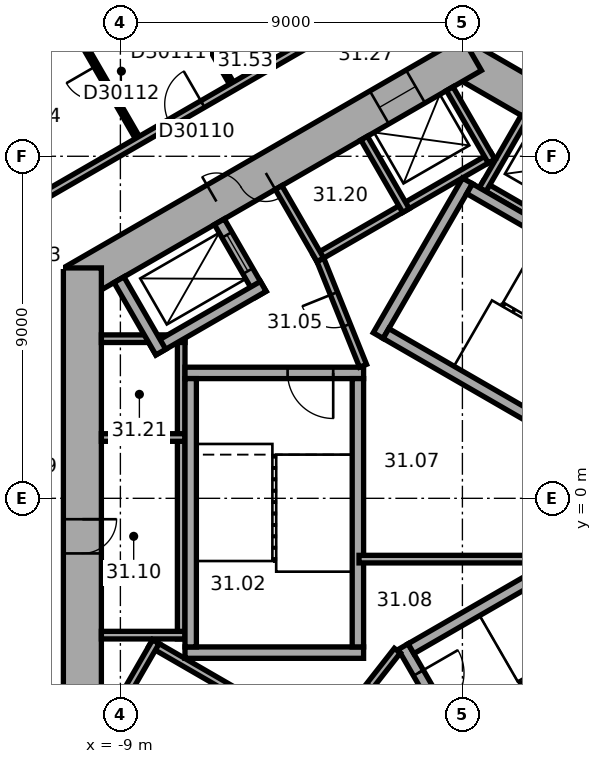
"""IFC4 building model, lengths in metres.
Left out: names, types, materials, properties, quantities, classifications, styles, units other than length and angle.
Written with IfcOpenShell. Run it as: python <this file> out.ifc"""

import sys

from ifc_helpers import new_model, si_unit, direction, frame, frame_2d, origin, place, context, subcontext, project, spatial, rectangle, extrude, element, fill, save


model = new_model("IFC4")
c1 = context("Model", 3, precision=1e-05, world=origin(), true_north=direction((0.0, 1.0)))
c2 = subcontext(c1, "Body", "Model", "MODEL_VIEW")
j1 = project(units=[si_unit("LENGTHUNIT", "METRE"), si_unit("PLANEANGLEUNIT", "RADIAN")], contexts=[c1])
p1 = place(None, origin())
s1 = spatial("IfcSite", under=j1, at=p1, CompositionType="ELEMENT")
p2 = place(p1, origin())
s2 = spatial("IfcBuilding", under=s1, at=p2, CompositionType="ELEMENT")
p3 = place(p2, frame((0.0, 0.0, 128.1)))
s3 = spatial("IfcBuildingStorey", under=s2, at=p3, CompositionType="ELEMENT", Elevation=128.1)
p4 = place(p3, frame((10.25, 5.629, 0.0), z_axis=(0.0, 0.0, 1.0), x_axis=(-0.866022616891, 0.50000482701, 0.0)))
e1 = element("IfcWall", 1, at=p4, inside=s3, PredefinedType="SHEAR", context=c2, shape_type="SweptSolid", body=[
    extrude(rectangle(XDim=12.125, YDim=1.0, at=frame_2d((6.062, 0.0))), origin(), (0.0, 0.0, 1.0), 3.7),
])
p5 = place(p4, frame((2.612, 0.0, 0.0)))
e2 = element("IfcOpeningElement", 2, at=p5, cuts=e1, PredefinedType="OPENING", context=c2, shape_type="SweptSolid", body=[
    extrude(rectangle(XDim=1.1, YDim=2.1, at=frame_2d((0.55, 1.05))), frame((0.0, 0.51, 0.0), z_axis=(0.0, -1.0, 0.0), x_axis=(1.0, 0.0, 0.0)), (0.0, 0.0, 1.0), 1.02),
])
p6 = place(p4, frame((5.212, 0.0, 0.0)))
e3 = element("IfcOpeningElement", 3, at=p6, cuts=e1, PredefinedType="OPENING", context=c2, shape_type="SweptSolid", body=[
    extrude(rectangle(XDim=1.1, YDim=2.1, at=frame_2d((0.55, 1.05))), frame((0.0, 0.51, 0.0), z_axis=(0.0, -1.0, 0.0), x_axis=(1.0, 0.0, 0.0)), (0.0, 0.0, 1.0), 1.02),
])
p7 = place(p4, frame((7.812, 0.0, 0.0)))
e4 = element("IfcOpeningElement", 4, at=p7, cuts=e1, PredefinedType="OPENING", context=c2, shape_type="SweptSolid", body=[
    extrude(rectangle(XDim=1.1, YDim=2.1, at=frame_2d((0.55, 1.05))), frame((0.0, 0.51, 0.0), z_axis=(0.0, -1.0, 0.0), x_axis=(1.0, 0.0, 0.0)), (0.0, 0.0, 1.0), 1.02),
])
p8 = place(p3, frame((0.25, 11.691, 0.0), z_axis=(0.0, 0.0, 1.0), x_axis=(-0.866022616891, -0.50000482701, 0.0)))
e5 = element("IfcWall", 5, at=p8, inside=s3, PredefinedType="SHEAR", context=c2, shape_type="SweptSolid", body=[
    extrude(rectangle(XDim=12.125, YDim=1.0, at=frame_2d((6.062, 0.0))), origin(), (0.0, 0.0, 1.0), 3.7),
])
p9 = place(p8, frame((6.262, 0.0, 0.0)))
e6 = element("IfcOpeningElement", 6, at=p9, cuts=e5, PredefinedType="OPENING", context=c2, shape_type="SweptSolid", body=[
    extrude(rectangle(XDim=1.5, YDim=2.1, at=frame_2d((0.75, 1.05))), frame((0.0, 0.51, 0.0), z_axis=(0.0, -1.0, 0.0), x_axis=(1.0, 0.0, 0.0)), (0.0, 0.0, 1.0), 1.02),
])
p10 = place(p8, frame((1.712, 0.0, 0.0)))
e7 = element("IfcOpeningElement", 7, at=p10, cuts=e5, PredefinedType="OPENING", context=c2, shape_type="SweptSolid", body=[
    extrude(rectangle(XDim=1.1, YDim=2.1, at=frame_2d((0.55, 1.05))), frame((0.0, 0.51, 0.0), z_axis=(0.0, -1.0, 0.0), x_axis=(1.0, 0.0, 0.0)), (0.0, 0.0, 1.0), 1.02),
])
p11 = place(p3, frame((-10.0, 6.062, 0.0), z_axis=(0.0, 0.0, 1.0), x_axis=(0.0, -1.0, 0.0)))
e8 = element("IfcWall", 8, at=p11, inside=s3, PredefinedType="SHEAR", context=c2, shape_type="SweptSolid", body=[
    extrude(rectangle(XDim=12.125, YDim=1.0, at=frame_2d((6.062, 0.0))), origin(), (0.0, 0.0, 1.0), 3.7),
])
p12 = place(p11, frame((6.612, 0.0, 0.0)))
e9 = element("IfcOpeningElement", 9, at=p12, cuts=e8, PredefinedType="OPENING", context=c2, shape_type="SweptSolid", body=[
    extrude(rectangle(XDim=0.9, YDim=2.1, at=frame_2d((0.45, 1.05))), frame((0.0, 0.51, 0.0), z_axis=(0.0, -1.0, 0.0), x_axis=(1.0, 0.0, 0.0)), (0.0, 0.0, 1.0), 1.02),
])
p13 = place(p3, frame((7.424, 4.259, 0.0), z_axis=(0.0, 0.0, 1.0), x_axis=(-0.866026010844, 0.49999894854, 0.0)))
e10 = element("IfcWall", 10, at=p13, inside=s3, PredefinedType="PARTITIONING", context=c2, shape_type="SweptSolid", body=[
    extrude(rectangle(XDim=8.0, YDim=0.2, at=frame_2d((4.0, 0.0))), origin(), (0.0, 0.0, 1.0), 3.42),
])
p14 = place(p3, frame((0.532, 8.122, 0.0), z_axis=(0.0, 0.0, 1.0), x_axis=(0.500077893725, 0.86598042715, 0.0)))
e11 = element("IfcWall", 11, at=p14, inside=s3, PredefinedType="PARTITIONING", context=c2, shape_type="SweptSolid", body=[
    extrude(rectangle(XDim=2.2, YDim=0.2, at=frame_2d((1.1, 0.0))), origin(), (0.0, 0.0, 1.0), 3.42),
])
p15 = place(p3, frame((0.803, 9.009, 0.0), z_axis=(0.0, 0.0, 1.0), x_axis=(-0.866028230842, -0.499995103361, 0.0)))
e12 = element("IfcWall", 12, at=p15, inside=s3, PredefinedType="PARTITIONING", context=c2, shape_type="SweptSolid", body=[
    extrude(rectangle(XDim=5.4, YDim=0.2, at=frame_2d((2.7, 0.0))), origin(), (0.0, 0.0, 1.0), 3.42),
])
p16 = place(p3, frame((0.767, 8.872, 0.0), z_axis=(0.0, 0.0, 1.0), x_axis=(-0.499994660107, 0.866028486751, 0.0)))
e13 = element("IfcWall", 13, at=p16, inside=s3, PredefinedType="PARTITIONING", context=c2, shape_type="SweptSolid", body=[
    extrude(rectangle(XDim=2.2, YDim=0.2, at=frame_2d((1.1, 0.0))), origin(), (0.0, 0.0, 1.0), 3.42),
])
for number, where, z_axis, x_axis in (
    (14, (-1.485, 7.572, 0.0), (0.0, 0.0, 1.0), (-0.5, 0.866, 0.0)),
    (15, (-3.737, 6.272, 0.0), (0.0, 0.0, 1.0), (-0.5, 0.866, 0.0)),
):
    element("IfcWall", number, at=place(p3, frame(where, z_axis=z_axis, x_axis=x_axis)), inside=s3, PredefinedType="PARTITIONING", context=c2, shape_type="SweptSolid", body=[
        extrude(rectangle(XDim=2.2, YDim=0.2, at=frame_2d((1.1, 0.0))), origin(), (0.0, 0.0, 1.0), 3.42),
    ])
p17 = place(p3, frame((-7.4, 4.3, 0.0), z_axis=(0.0, 0.0, 1.0), x_axis=(0.0, -1.0, 0.0)))
e16 = element("IfcWall", 16, at=p17, inside=s3, PredefinedType="PARTITIONING", context=c2, shape_type="SweptSolid", body=[
    extrude(rectangle(XDim=8.0, YDim=0.2, at=frame_2d((4.0, 0.0))), origin(), (0.0, 0.0, 1.0), 3.42),
])
for number, where, z_axis, x_axis in (
    (17, (-7.3, 4.2, 0.0), (0.0, 0.0, 1.0), (-1.0, 0.0, 0.0)),
    (18, (-7.3, 1.6, 0.0), (0.0, 0.0, 1.0), (-1.0, 0.0, 0.0)),
    (19, (-7.3, -3.6, 0.0), (0.0, 0.0, 1.0), (-1.0, 0.0, 0.0)),
):
    element("IfcWall", number, at=place(p3, frame(where, z_axis=z_axis, x_axis=x_axis)), inside=s3, PredefinedType="PARTITIONING", context=c2, shape_type="SweptSolid", body=[
        extrude(rectangle(XDim=2.2, YDim=0.2, at=frame_2d((1.1, 0.0))), origin(), (0.0, 0.0, 1.0), 3.42),
    ])
p18 = place(p3, frame((-8.203, -3.809, 0.0), z_axis=(0.0, 0.0, 1.0), x_axis=(0.866028230842, -0.499995103361, 0.0)))
e20 = element("IfcWall", 20, at=p18, inside=s3, PredefinedType="PARTITIONING", context=c2, shape_type="SweptSolid", body=[
    extrude(rectangle(XDim=5.4, YDim=0.2, at=frame_2d((2.7, 0.0))), origin(), (0.0, 0.0, 1.0), 3.42),
])
p19 = place(p3, frame((-8.067, -3.772, 0.0), z_axis=(0.0, 0.0, 1.0), x_axis=(-0.50002983664, -0.866008176907, 0.0)))
e21 = element("IfcWall", 21, at=p19, inside=s3, PredefinedType="PARTITIONING", context=c2, shape_type="SweptSolid", body=[
    extrude(rectangle(XDim=2.2, YDim=0.2, at=frame_2d((1.1, 0.0))), origin(), (0.0, 0.0, 1.0), 3.42),
])
p20 = place(p3, frame((-0.024, -8.559, 0.0), z_axis=(0.0, 0.0, 1.0), x_axis=(0.866026010844, 0.49999894854, 0.0)))
e22 = element("IfcWall", 22, at=p20, inside=s3, PredefinedType="PARTITIONING", context=c2, shape_type="SweptSolid", body=[
    extrude(rectangle(XDim=8.0, YDim=0.2, at=frame_2d((4.0, 0.0))), origin(), (0.0, 0.0, 1.0), 3.42),
])
p21 = place(p3, frame((-2.216, 4.282, 0.0), z_axis=(0.0, 0.0, 1.0), x_axis=(0.499977259774, 0.866038532462, 0.0)))
e23 = element("IfcWall", 23, at=p21, inside=s3, PredefinedType="SHEAR", context=c2, shape_type="SweptSolid", body=[
    extrude(rectangle(XDim=4.7, YDim=0.3, at=frame_2d((2.35, 0.0))), origin(), (0.0, 0.0, 1.0), 3.42),
])
for number, where, z_axis, x_axis in (
    (24, (4.103, 0.807, 0.0), (0.0, 0.0, 1.0), (-0.866, 0.5, 0.0)),
    (25, (6.303, 4.617, 0.0), (0.0, 0.0, 1.0), (-0.866, 0.5, 0.0)),
):
    element("IfcWall", number, at=place(p3, frame(where, z_axis=z_axis, x_axis=x_axis)), inside=s3, PredefinedType="SHEAR", context=c2, shape_type="SweptSolid", body=[
        extrude(rectangle(XDim=7.06, YDim=0.3, at=frame_2d((3.53, 0.0))), origin(), (0.0, 0.0, 1.0), 3.42),
    ])
p22 = place(p3, frame((-2.6, 3.3, 0.0), z_axis=(0.0, 0.0, 1.0), x_axis=(-1.0, 0.0, 0.0)))
e26 = element("IfcWall", 26, at=p22, inside=s3, PredefinedType="SHEAR", context=c2, shape_type="SweptSolid", body=[
    extrude(rectangle(XDim=4.7, YDim=0.3, at=frame_2d((2.35, 0.0))), origin(), (0.0, 0.0, 1.0), 3.42),
])
p23 = place(p22, frame((0.8, 0.0, 0.0)))
e27 = element("IfcOpeningElement", 27, at=p23, cuts=e26, PredefinedType="OPENING", context=c2, shape_type="SweptSolid", body=[
    extrude(rectangle(XDim=1.2, YDim=2.1, at=frame_2d((0.6, 1.05))), frame((0.0, 0.16, 0.0), z_axis=(0.0, -1.0, 0.0), x_axis=(1.0, 0.0, 0.0)), (0.0, 0.0, 1.0), 0.32),
])
p24 = place(p3, frame((-2.6, -4.06, 0.0), z_axis=(0.0, 0.0, 1.0), x_axis=(-1.0, 0.0, 0.0)))
e28 = element("IfcWall", 28, at=p24, inside=s3, PredefinedType="SHEAR", context=c2, shape_type="SweptSolid", body=[
    extrude(rectangle(XDim=4.7, YDim=0.3, at=frame_2d((2.35, 0.0))), origin(), (0.0, 0.0, 1.0), 3.42),
])
for number, where, z_axis, x_axis in (
    (29, (-2.75, 3.15, 0.0), (0.0, 0.0, 1.0), (0.0, -1.0, 0.0)),
    (30, (-7.15, 3.15, 0.0), (0.0, 0.0, 1.0), (0.0, -1.0, 0.0)),
):
    element("IfcWall", number, at=place(p3, frame(where, z_axis=z_axis, x_axis=x_axis)), inside=s3, PredefinedType="SHEAR", context=c2, shape_type="SweptSolid", body=[
        extrude(rectangle(XDim=7.06, YDim=0.3, at=frame_2d((3.53, 0.0))), origin(), (0.0, 0.0, 1.0), 3.42),
    ])
p25 = place(p3, frame((-1.558, -3.902, 0.0), z_axis=(0.0, 0.0, 1.0), x_axis=(0.499977259774, -0.866038532462, 0.0)))
e31 = element("IfcWall", 31, at=p25, inside=s3, PredefinedType="SHEAR", context=c2, shape_type="SweptSolid", body=[
    extrude(rectangle(XDim=4.7, YDim=0.3, at=frame_2d((2.35, 0.0))), origin(), (0.0, 0.0, 1.0), 3.42),
])
p26 = place(p25, frame((0.8, 0.0, 0.0)))
e32 = element("IfcOpeningElement", 32, at=p26, cuts=e31, PredefinedType="OPENING", context=c2, shape_type="SweptSolid", body=[
    extrude(rectangle(XDim=1.2, YDim=2.1, at=frame_2d((0.6, 1.05))), frame((0.0, 0.16, 0.0), z_axis=(0.0, -1.0, 0.0), x_axis=(1.0, 0.0, 0.0)), (0.0, 0.0, 1.0), 0.32),
])
for number, where, z_axis, x_axis in (
    (33, (-1.353, -3.957, 0.0), (0.0, 0.0, 1.0), (0.866, 0.5, 0.0)),
    (34, (0.847, -7.767, 0.0), (0.0, 0.0, 1.0), (0.866, 0.5, 0.0)),
):
    element("IfcWall", number, at=place(p3, frame(where, z_axis=z_axis, x_axis=x_axis)), inside=s3, PredefinedType="SHEAR", context=c2, shape_type="SweptSolid", body=[
        extrude(rectangle(XDim=7.06, YDim=0.3, at=frame_2d((3.53, 0.0))), origin(), (0.0, 0.0, 1.0), 3.42),
    ])
p27 = place(p3, frame((-5.295, 5.372, 0.0), z_axis=(0.0, 0.0, 1.0), x_axis=(-0.500077893725, 0.86598042715, 0.0)))
e35 = element("IfcWall", 35, at=p27, inside=s3, PredefinedType="SHEAR", context=c2, shape_type="SweptSolid", body=[
    extrude(rectangle(XDim=2.2, YDim=0.3, at=frame_2d((1.1, 0.0))), origin(), (0.0, 0.0, 1.0), 3.42),
])
p28 = place(p27, frame((0.7, 0.0, 0.0)))
e36 = element("IfcOpeningElement", 36, at=p28, cuts=e35, PredefinedType="OPENING", context=c2, shape_type="SweptSolid", body=[
    extrude(rectangle(XDim=1.1, YDim=2.1, at=frame_2d((0.55, 1.05))), frame((0.0, 0.16, 0.0), z_axis=(0.0, -1.0, 0.0), x_axis=(1.0, 0.0, 0.0)), (0.0, 0.0, 1.0), 0.32),
])
p29 = place(p3, frame((-5.24, 5.577, 0.0), z_axis=(0.0, 0.0, 1.0), x_axis=(-0.866014461049, -0.500018952895, 0.0)))
e37 = element("IfcWall", 37, at=p29, inside=s3, PredefinedType="SHEAR", context=c2, shape_type="SweptSolid", body=[
    extrude(rectangle(XDim=3.35, YDim=0.3, at=frame_2d((1.675, 0.0))), origin(), (0.0, 0.0, 1.0), 3.42),
])
p30 = place(p3, frame((-7.937, 3.847, 0.0), z_axis=(0.0, 0.0, 1.0), x_axis=(-0.50002983664, 0.866008176907, 0.0)))
e38 = element("IfcWall", 38, at=p30, inside=s3, PredefinedType="SHEAR", context=c2, shape_type="SweptSolid", body=[
    extrude(rectangle(XDim=2.2, YDim=0.3, at=frame_2d((1.1, 0.0))), origin(), (0.0, 0.0, 1.0), 3.42),
])
p31 = place(p3, frame((-2.615, 3.487, 0.0), z_axis=(0.0, 0.0, 1.0), x_axis=(-0.373576831041, 0.92759924068, 0.0)))
e39 = element("IfcWall", 39, at=p31, inside=s3, PredefinedType="PARTITIONING", context=c2, shape_type="SweptSolid", body=[
    extrude(rectangle(XDim=3.002, YDim=0.2, at=frame_2d((1.501, 0.0))), origin(), (0.0, 0.0, 1.0), 3.42),
])
p32 = place(p31, frame((1.15, 0.0, 0.0)))
e40 = element("IfcOpeningElement", 40, at=p32, cuts=e39, PredefinedType="OPENING", context=c2, shape_type="SweptSolid", body=[
    extrude(rectangle(XDim=0.9, YDim=2.1, at=frame_2d((0.45, 1.05))), frame((0.0, 0.11, 0.0), z_axis=(0.0, -1.0, 0.0), x_axis=(1.0, 0.0, 0.0)), (0.0, 0.0, 1.0), 0.22),
])
p33 = place(p3, frame((-1.712, -4.008, 0.0), z_axis=(0.0, 0.0, 1.0), x_axis=(-0.616549420702, -0.787316208287, 0.0)))
e41 = element("IfcWall", 41, at=p33, inside=s3, PredefinedType="PARTITIONING", context=c2, shape_type="SweptSolid", body=[
    extrude(rectangle(XDim=3.002, YDim=0.2, at=frame_2d((1.501, 0.0))), origin(), (0.0, 0.0, 1.0), 3.42),
])
p34 = place(p33, frame((1.15, 0.0, 0.0)))
e42 = element("IfcOpeningElement", 42, at=p34, cuts=e41, PredefinedType="OPENING", context=c2, shape_type="SweptSolid", body=[
    extrude(rectangle(XDim=0.9, YDim=2.1, at=frame_2d((0.45, 1.05))), frame((0.0, 0.11, 0.0), z_axis=(0.0, -1.0, 0.0), x_axis=(1.0, 0.0, 0.0)), (0.0, 0.0, 1.0), 0.22),
])
p35 = place(p3, frame((-2.72, -1.6, 0.0), z_axis=(0.0, 0.0, 1.0), x_axis=(1.0, 0.0, 0.0)))
e43 = element("IfcWall", 43, at=p35, inside=s3, PredefinedType="PARTITIONING", context=c2, shape_type="SweptSolid", body=[
    extrude(rectangle(XDim=5.269, YDim=0.2, at=frame_2d((2.634, 0.0))), origin(), (0.0, 0.0, 1.0), 3.42),
])
p36 = place(p3, frame((-13.556, 10.649, 0.0), z_axis=(0.0, 0.0, 1.0), x_axis=(0.866020939036, 0.500007733091, 0.0)))
e44 = element("IfcWall", 44, at=p36, inside=s3, PredefinedType="PARTITIONING", context=c2, shape_type="SweptSolid", body=[
    extrude(rectangle(XDim=3.753, YDim=0.12, at=frame_2d((1.877, 0.0))), origin(), (0.0, 0.0, 1.0), 3.42),
])
p37 = place(p3, frame((-10.275, 12.473, 0.0), z_axis=(0.0, 0.0, 1.0), x_axis=(0.500009156386, -0.866020117278, 0.0)))
e45 = element("IfcWall", 45, at=p37, inside=s3, PredefinedType="PARTITIONING", context=c2, shape_type="SweptSolid", body=[
    extrude(rectangle(XDim=3.44, YDim=0.12, at=frame_2d((1.72, 0.0))), origin(), (0.0, 0.0, 1.0), 3.42),
])
p38 = place(p37, frame((1.27, 0.0, 0.0)))
e46 = element("IfcOpeningElement", 46, at=p38, cuts=e45, PredefinedType="OPENING", context=c2, shape_type="SweptSolid", body=[
    extrude(rectangle(XDim=0.9, YDim=2.1, at=frame_2d((0.45, 1.05))), frame((0.0, 0.07, 0.0), z_axis=(0.0, -1.0, 0.0), x_axis=(1.0, 0.0, 0.0)), (0.0, 0.0, 1.0), 0.14),
])
p39 = place(p3, frame((-6.078, 10.925, 0.0), z_axis=(0.0, 0.0, 1.0), x_axis=(-0.500002508028, 0.866023955769, 0.0)))
e47 = element("IfcWall", 47, at=p39, inside=s3, PredefinedType="PARTITIONING", context=c2, shape_type="SweptSolid", body=[
    extrude(rectangle(XDim=2.44, YDim=0.12, at=frame_2d((1.22, 0.0))), origin(), (0.0, 0.0, 1.0), 2.87),
])
p40 = place(p39, frame((0.77, 0.0, 0.0)))
e48 = element("IfcOpeningElement", 48, at=p40, cuts=e47, PredefinedType="OPENING", context=c2, shape_type="SweptSolid", body=[
    extrude(rectangle(XDim=0.9, YDim=2.1, at=frame_2d((0.45, 1.05))), frame((0.0, 0.07, 0.0), z_axis=(0.0, -1.0, 0.0), x_axis=(1.0, 0.0, 0.0)), (0.0, 0.0, 1.0), 0.14),
])
p41 = place(p3, frame((-4.209, 11.888, 0.0), z_axis=(0.0, 0.0, 1.0), x_axis=(-0.866020930448, -0.500007747966, 0.0)))
e49 = element("IfcWall", 49, at=p41, inside=s3, PredefinedType="PARTITIONING", context=c2, shape_type="SweptSolid", body=[
    extrude(rectangle(XDim=8.321, YDim=0.2, at=frame_2d((4.161, 0.0))), origin(), (0.0, 0.0, 1.0), 3.42),
])
p42 = place(p41, frame((3.031, 0.0, 0.0)))
e50 = element("IfcOpeningElement", 50, at=p42, cuts=e49, PredefinedType="OPENING", context=c2, shape_type="SweptSolid", body=[
    extrude(rectangle(XDim=1.0, YDim=2.1, at=frame_2d((0.5, 1.05))), frame((0.0, 0.11, 0.0), z_axis=(0.0, -1.0, 0.0), x_axis=(1.0, 0.0, 0.0)), (0.0, 0.0, 1.0), 0.22),
])
p43 = place(p9, origin())
e51 = element("IfcDoor", 51, at=p43, inside=s3, OperationType="DOUBLE_DOOR_SINGLE_SWING", PredefinedType="DOOR", context=c2, shape_type="SweptSolid", body=[
    extrude(rectangle(XDim=1.5, YDim=2.1, at=frame_2d((0.75, 1.05))), frame((0.0, 0.025, 0.0), z_axis=(0.0, -1.0, 0.0), x_axis=(1.0, 0.0, 0.0)), (0.0, 0.0, 1.0), 0.05),
])
fill(e6, e51)
p44 = place(p23, origin())
e52 = element("IfcDoor", 52, at=p44, inside=s3, OperationType="SINGLE_SWING_RIGHT", PredefinedType="DOOR", context=c2, shape_type="SweptSolid", body=[
    extrude(rectangle(XDim=1.2, YDim=2.1, at=frame_2d((0.6, 1.05))), frame((0.0, 0.025, 0.0), z_axis=(0.0, -1.0, 0.0), x_axis=(1.0, 0.0, 0.0)), (0.0, 0.0, 1.0), 0.05),
])
fill(e27, e52)
p45 = place(p26, origin())
e53 = element("IfcDoor", 53, at=p45, inside=s3, OperationType="SINGLE_SWING_RIGHT", PredefinedType="DOOR", context=c2, shape_type="SweptSolid", body=[
    extrude(rectangle(XDim=1.2, YDim=2.1, at=frame_2d((0.6, 1.05))), frame((0.0, 0.025, 0.0), z_axis=(0.0, -1.0, 0.0), x_axis=(1.0, 0.0, 0.0)), (0.0, 0.0, 1.0), 0.05),
])
fill(e32, e53)
p46 = place(p32, origin())
e54 = element("IfcDoor", 54, at=p46, inside=s3, OperationType="SINGLE_SWING_LEFT", PredefinedType="DOOR", context=c2, shape_type="SweptSolid", body=[
    extrude(rectangle(XDim=0.9, YDim=2.1, at=frame_2d((0.45, 1.05))), frame((0.0, 0.025, 0.0), z_axis=(0.0, -1.0, 0.0), x_axis=(1.0, 0.0, 0.0)), (0.0, 0.0, 1.0), 0.05),
])
fill(e40, e54)
p47 = place(p34, origin())
e55 = element("IfcDoor", 55, at=p47, inside=s3, OperationType="SINGLE_SWING_LEFT", PredefinedType="DOOR", context=c2, shape_type="SweptSolid", body=[
    extrude(rectangle(XDim=0.9, YDim=2.1, at=frame_2d((0.45, 1.05))), frame((0.0, 0.025, 0.0), z_axis=(0.0, -1.0, 0.0), x_axis=(1.0, 0.0, 0.0)), (0.0, 0.0, 1.0), 0.05),
])
fill(e42, e55)
p48 = place(p12, origin())
e56 = element("IfcDoor", 56, at=p48, inside=s3, OperationType="SINGLE_SWING_LEFT", PredefinedType="DOOR", context=c2, shape_type="SweptSolid", body=[
    extrude(rectangle(XDim=0.9, YDim=2.1, at=frame_2d((0.45, 1.05))), frame((0.0, 0.025, 0.0), z_axis=(0.0, -1.0, 0.0), x_axis=(1.0, 0.0, 0.0)), (0.0, 0.0, 1.0), 0.05),
])
fill(e9, e56)
p49 = place(p28, origin())
e57 = element("IfcDoor", 57, at=p49, inside=s3, OperationType="DOUBLE_DOOR_SLIDING", PredefinedType="DOOR", context=c2, shape_type="SweptSolid", body=[
    extrude(rectangle(XDim=1.1, YDim=2.1, at=frame_2d((0.55, 1.05))), frame((0.0, 0.025, 0.0), z_axis=(0.0, -1.0, 0.0), x_axis=(1.0, 0.0, 0.0)), (0.0, 0.0, 1.0), 0.05),
])
fill(e36, e57)
p50 = place(p10, origin())
e58 = element("IfcDoor", 58, at=p50, inside=s3, OperationType="DOUBLE_DOOR_SLIDING", PredefinedType="DOOR", context=c2, shape_type="SweptSolid", body=[
    extrude(rectangle(XDim=1.1, YDim=2.1, at=frame_2d((0.55, 1.05))), frame((0.0, 0.025, 0.0), z_axis=(0.0, -1.0, 0.0), x_axis=(1.0, 0.0, 0.0)), (0.0, 0.0, 1.0), 0.05),
])
fill(e7, e58)
p51 = place(p42, origin())
e59 = element("IfcDoor", 59, at=p51, inside=s3, OperationType="SINGLE_SWING_LEFT", PredefinedType="DOOR", context=c2, shape_type="SweptSolid", body=[
    extrude(rectangle(XDim=1.0, YDim=2.1, at=frame_2d((0.5, 1.05))), frame((0.0, 0.025, 0.0), z_axis=(0.0, -1.0, 0.0), x_axis=(1.0, 0.0, 0.0)), (0.0, 0.0, 1.0), 0.05),
])
fill(e50, e59)
p52 = place(p40, origin())
e60 = element("IfcDoor", 60, at=p52, inside=s3, OperationType="SINGLE_SWING_LEFT", PredefinedType="DOOR", context=c2, shape_type="SweptSolid", body=[
    extrude(rectangle(XDim=0.9, YDim=2.1, at=frame_2d((0.45, 1.05))), frame((0.0, 0.025, 0.0), z_axis=(0.0, -1.0, 0.0), x_axis=(1.0, 0.0, 0.0)), (0.0, 0.0, 1.0), 0.05),
])
fill(e48, e60)
p53 = place(p38, origin())
e61 = element("IfcDoor", 61, at=p53, inside=s3, OperationType="SINGLE_SWING_LEFT", PredefinedType="DOOR", context=c2, shape_type="SweptSolid", body=[
    extrude(rectangle(XDim=0.9, YDim=2.1, at=frame_2d((0.45, 1.05))), frame((0.0, 0.025, 0.0), z_axis=(0.0, -1.0, 0.0), x_axis=(1.0, 0.0, 0.0)), (0.0, 0.0, 1.0), 0.05),
])
fill(e46, e61)
save(model, sys.argv[1])
